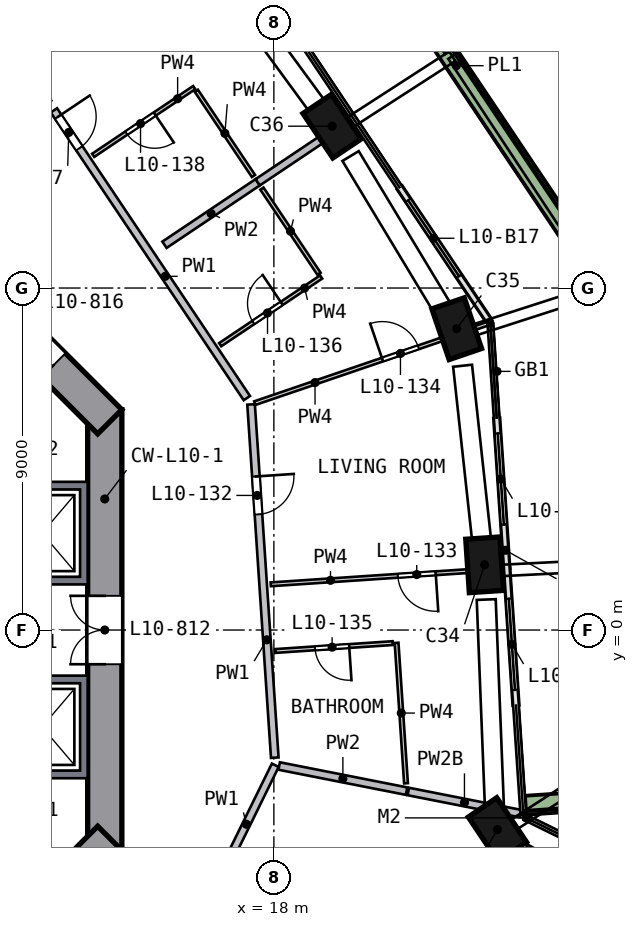
"""IFC4 building model, lengths in metres.
Left out: names, types, materials, properties, quantities, classifications, styles, units other than length and angle.
Written with IfcOpenShell. Run it as: python <this file> out.ifc"""

import sys

from ifc_helpers import new_model, si_unit, direction, frame, frame_2d, origin, origin_2d, place, context, subcontext, project, spatial, polyline, rectangle, outline, extrude, element, fill, save


model = new_model("IFC4")
c1 = context("Model", 3, precision=1e-05, world=origin(), true_north=direction((0.0, 1.0)))
c2 = subcontext(c1, "Body", "Model", "MODEL_VIEW")
j1 = project(units=[si_unit("LENGTHUNIT", "METRE"), si_unit("PLANEANGLEUNIT", "RADIAN")], contexts=[c1])
p1 = place(None, origin())
s1 = spatial("IfcSite", under=j1, at=p1, CompositionType="ELEMENT")
p2 = place(p1, origin())
s2 = spatial("IfcBuilding", under=s1, at=p2, CompositionType="ELEMENT")
p3 = place(p2, frame((0.0, 0.0, 49.5)))
s3 = spatial("IfcBuildingStorey", under=s2, at=p3, CompositionType="ELEMENT", Elevation=49.5)
p4 = place(p3, frame((23.853, -5.388, 0.0), z_axis=(0.024628968, 0.113642923, 0.993216341), x_axis=(0.560989049, -0.823913514, 0.080360497)))
e1 = element("IfcColumn", 1, at=p4, inside=s3, PredefinedType="COLUMN", context=c2, shape_type="SweptSolid", body=[
    extrude(rectangle(XDim=1.4, YDim=0.9, at=origin_2d()), origin(), (0.0, 0.0, 1.0), 3.212),
])
p5 = place(p3, frame((23.555, 1.581, 0.0), z_axis=(-0.008441555, 0.112021718, 0.993669902), x_axis=(-0.066257297, 0.991458896, -0.112335337)))
e2 = element("IfcColumn", 2, at=p5, inside=s3, PredefinedType="COLUMN", context=c2, shape_type="SweptSolid", body=[
    extrude(rectangle(XDim=1.4, YDim=0.9, at=origin_2d()), origin(), (0.0, 0.0, 1.0), 3.21),
])
p6 = place(p3, frame((22.857, 7.799, 0.0), z_axis=(-0.038013875, 0.108415572, 0.993378583), x_axis=(0.320720069, -0.940181145, 0.114882776)))
e3 = element("IfcColumn", 3, at=p6, inside=s3, PredefinedType="COLUMN", context=c2, shape_type="SweptSolid", body=[
    extrude(rectangle(XDim=1.4, YDim=0.9, at=origin_2d()), origin(), (0.0, 0.0, 1.0), 3.211),
])
p7 = place(p3, frame((19.609, 13.147, 0.0), z_axis=(-0.063274346, 0.092706042, 0.993681009), x_axis=(-0.553189961, 0.825459696, -0.112237059)))
e4 = element("IfcColumn", 4, at=p7, inside=s3, PredefinedType="COLUMN", context=c2, shape_type="SweptSolid", body=[
    extrude(rectangle(XDim=1.4, YDim=0.9, at=origin_2d()), origin(), (0.0, 0.0, 1.0), 3.21),
])
p8 = place(p3, frame((13.55, -5.799, 0.0), z_axis=(0.0, 0.0, 1.0), x_axis=(0.0, 1.0, 0.0)))
e5 = element("IfcWall", 5, at=p8, inside=s3, PredefinedType="SHEAR", context=c2, shape_type="SweptSolid", body=[
    extrude(rectangle(XDim=11.598, YDim=0.9, at=frame_2d((5.799, 0.0))), origin(), (0.0, 0.0, 1.0), 3.5),
])
p9 = place(p8, frame((4.899, 0.0, 0.0)))
e6 = element("IfcOpeningElement", 6, at=p9, cuts=e5, PredefinedType="OPENING", context=c2, shape_type="SweptSolid", body=[
    extrude(rectangle(XDim=1.8, YDim=2.1, at=frame_2d((0.9, 1.05))), frame((0.0, 0.46, 0.0), z_axis=(0.0, -1.0, 0.0), x_axis=(1.0, 0.0, 0.0)), (0.0, 0.0, 1.0), 0.92),
])
p10 = place(p3, frame((13.682, 5.481, 0.0), z_axis=(0.0, 0.0, 1.0), x_axis=(-0.707106781, 0.707106781, 0.0)))
e7 = element("IfcWall", 7, at=p10, inside=s3, PredefinedType="SHEAR", context=c2, shape_type="SweptSolid", body=[
    extrude(rectangle(XDim=11.598, YDim=0.9, at=frame_2d((5.799, 0.0))), origin(), (0.0, 0.0, 1.0), 3.5),
])
p11 = place(p10, frame((2.099, 0.0, 0.0)))
e8 = element("IfcOpeningElement", 8, at=p11, cuts=e7, PredefinedType="OPENING", context=c2, shape_type="SweptSolid", body=[
    extrude(rectangle(XDim=1.2, YDim=2.1, at=frame_2d((0.6, 1.05))), frame((0.0, 0.46, 0.0), z_axis=(0.0, -1.0, 0.0), x_axis=(1.0, 0.0, 0.0)), (0.0, 0.0, 1.0), 0.92),
])
p12 = place(p3, frame((5.481, -13.682, 0.0), z_axis=(0.0, 0.0, 1.0), x_axis=(0.707106781, 0.707106781, 0.0)))
e9 = element("IfcWall", 9, at=p12, inside=s3, PredefinedType="SHEAR", context=c2, shape_type="SweptSolid", body=[
    extrude(rectangle(XDim=11.598, YDim=0.9, at=frame_2d((5.799, 0.0))), origin(), (0.0, 0.0, 1.0), 3.5),
])
p13 = place(p12, frame((2.099, 0.0, 0.0)))
e10 = element("IfcOpeningElement", 10, at=p13, cuts=e9, PredefinedType="OPENING", context=c2, shape_type="SweptSolid", body=[
    extrude(rectangle(XDim=1.2, YDim=2.1, at=frame_2d((0.6, 1.05))), frame((0.0, 0.46, 0.0), z_axis=(0.0, -1.0, 0.0), x_axis=(1.0, 0.0, 0.0)), (0.0, 0.0, 1.0), 0.92),
])
p14 = place(p3, frame((24.37, -1.972, 0.0), z_axis=(0.0, 0.0, 1.0), x_axis=(-0.066933094, 0.997757466, 0.0)))
e11 = element("IfcWall", 11, at=p14, inside=s3, PredefinedType="SOLIDWALL", context=c2, shape_type="SweptSolid", body=[
    extrude(rectangle(XDim=3.6, YDim=0.15, at=frame_2d((1.8, 0.0))), origin(), (0.0, 0.0, 1.0), 2.425),
])
p15 = place(p14, frame((0.4, 0.0, 0.0)))
e12 = element("IfcOpeningElement", 12, at=p15, cuts=e11, PredefinedType="OPENING", context=c2, shape_type="SweptSolid", body=[
    extrude(rectangle(XDim=2.4, YDim=2.4, at=frame_2d((1.2, 1.2))), frame((0.0, 0.085, 0.0), z_axis=(0.0, -1.0, 0.0), x_axis=(1.0, 0.0, 0.0)), (0.0, 0.0, 1.0), 0.17),
])
p16 = place(p3, frame((24.129, 1.62, 0.0), z_axis=(0.0, 0.0, 1.0), x_axis=(-0.067005873, 0.997752581, 0.0)))
e13 = element("IfcWall", 13, at=p16, inside=s3, PredefinedType="SOLIDWALL", context=c2, shape_type="SweptSolid", body=[
    extrude(rectangle(XDim=3.96, YDim=0.15, at=frame_2d((1.98, 0.0))), origin(), (0.0, 0.0, 1.0), 2.425),
])
p17 = place(p16, frame((1.16, 0.0, 0.0)))
e14 = element("IfcOpeningElement", 14, at=p17, cuts=e13, PredefinedType="OPENING", context=c2, shape_type="SweptSolid", body=[
    extrude(rectangle(XDim=2.4, YDim=2.4, at=frame_2d((1.2, 1.2))), frame((0.0, 0.085, 0.0), z_axis=(0.0, -1.0, 0.0), x_axis=(1.0, 0.0, 0.0)), (0.0, 0.0, 1.0), 0.17),
])
p18 = place(p3, frame((23.65, 8.151, 0.0), z_axis=(0.0, 0.0, 1.0), x_axis=(-0.556858652, 0.830607273, 0.0)))
e15 = element("IfcWall", 15, at=p18, inside=s3, PredefinedType="SOLIDWALL", context=c2, shape_type="SweptSolid", body=[
    extrude(rectangle(XDim=4.199, YDim=0.15, at=frame_2d((2.099, 0.0))), origin(), (0.0, 0.0, 1.0), 2.425),
])
p19 = place(p18, frame((1.399, 0.0, 0.0)))
e16 = element("IfcOpeningElement", 16, at=p19, cuts=e15, PredefinedType="OPENING", context=c2, shape_type="SweptSolid", body=[
    extrude(rectangle(XDim=2.4, YDim=2.4, at=frame_2d((1.2, 1.2))), frame((0.0, 0.085, 0.0), z_axis=(0.0, -1.0, 0.0), x_axis=(1.0, 0.0, 0.0)), (0.0, 0.0, 1.0), 0.17),
])
p20 = place(p3, frame((24.624, -4.611, 0.0), z_axis=(0.0, 0.0, 1.0), x_axis=(0.997752279, 0.067010365, 0.0)))
e17 = element("IfcWall", 17, at=p20, inside=s3, PredefinedType="SOLIDWALL", context=c2, shape_type="SweptSolid", body=[
    extrude(rectangle(XDim=3.199, YDim=0.5, at=frame_2d((1.599, 0.0))), origin(), (0.0, 0.0, 1.0), 0.7),
])
p21 = place(p3, frame((26.622, 9.152, 0.0), z_axis=(0.0, 0.0, 1.0), x_axis=(-0.55686597, 0.830602367, 0.0)))
e18 = element("IfcWall", 18, at=p21, inside=s3, PredefinedType="SOLIDWALL", context=c2, shape_type="SweptSolid", body=[
    extrude(rectangle(XDim=13.723, YDim=0.5, at=frame_2d((6.862, 0.0))), origin(), (0.0, 0.0, 1.0), 0.7),
])
p22 = place(p3, origin())
e19 = element("IfcWall", 19, at=p22, inside=s3, PredefinedType="SOLIDWALL", context=c2, shape_type="SweptSolid", body=[
    extrude(outline(polyline([(13.1, -3.9), (10.9, -3.9), (10.9, -3.7), (12.9, -3.7), (12.9, -1.4), (10.9, -1.4), (10.9, -1.2), (13.1, -1.2), (13.1, -3.9)])), origin(), (0.0, 0.0, 1.0), 3.19),
])
p23 = place(p3, origin())
e20 = element("IfcWall", 20, at=p23, inside=s3, PredefinedType="SOLIDWALL", context=c2, shape_type="SweptSolid", body=[
    extrude(outline(polyline([(13.1, 3.9), (13.1, 1.2), (10.9, 1.2), (10.9, 1.4), (12.9, 1.4), (12.9, 3.7), (10.9, 3.7), (10.9, 3.9), (13.1, 3.9)])), origin(), (0.0, 0.0, 1.0), 3.19),
])
p24 = place(p3, frame((12.212, 13.675, 0.0), z_axis=(0.0, 0.0, 1.0), x_axis=(0.556867612, -0.830601266, 0.0)))
e21 = element("IfcWall", 21, at=p24, inside=s3, PredefinedType="SOLIDWALL", context=c2, shape_type="SweptSolid", body=[
    extrude(rectangle(XDim=9.116, YDim=0.2, at=frame_2d((4.558, 0.0))), origin(), (0.0, 0.0, 1.0), 3.19),
])
p25 = place(p24, frame((0.2, 0.0, 0.0)))
e22 = element("IfcOpeningElement", 22, at=p25, cuts=e21, PredefinedType="OPENING", context=c2, shape_type="SweptSolid", body=[
    extrude(rectangle(XDim=1.0, YDim=2.1, at=frame_2d((0.5, 1.05))), frame((0.0, 0.11, 0.0), z_axis=(0.0, -1.0, 0.0), x_axis=(1.0, 0.0, 0.0)), (0.0, 0.0, 1.0), 0.22),
])
p26 = place(p3, frame((16.512, -6.662, 0.0), z_axis=(0.0, 0.0, 1.0), x_axis=(0.44087694, 0.89756756, 0.0)))
e23 = element("IfcWall", 23, at=p26, inside=s3, PredefinedType="SOLIDWALL", context=c2, shape_type="SweptSolid", body=[
    extrude(rectangle(XDim=3.458, YDim=0.2, at=frame_2d((1.729, 0.0))), origin(), (0.0, 0.0, 1.0), 3.19),
])
p27 = place(p3, frame((17.4, 5.937, 0.0), z_axis=(0.0, 0.0, 1.0), x_axis=(0.066952071, -0.997756193, 0.0)))
e24 = element("IfcWall", 24, at=p27, inside=s3, PredefinedType="SOLIDWALL", context=c2, shape_type="SweptSolid", body=[
    extrude(rectangle(XDim=9.317, YDim=0.2, at=frame_2d((4.658, 0.0))), origin(), (0.0, 0.0, 1.0), 3.19),
])
p28 = place(p27, frame((1.9, 0.0, 0.0)))
e25 = element("IfcOpeningElement", 25, at=p28, cuts=e24, PredefinedType="OPENING", context=c2, shape_type="SweptSolid", body=[
    extrude(rectangle(XDim=1.0, YDim=2.1, at=frame_2d((0.5, 1.05))), frame((0.0, 0.11, 0.0), z_axis=(0.0, -1.0, 0.0), x_axis=(1.0, 0.0, 0.0)), (0.0, 0.0, 1.0), 0.22),
])
p29 = place(p3, frame((15.122, 10.138, 0.0), z_axis=(0.0, 0.0, 1.0), x_axis=(0.830546242, 0.556949675, 0.0)))
e26 = element("IfcWall", 26, at=p29, inside=s3, PredefinedType="SOLIDWALL", context=c2, shape_type="SweptSolid", body=[
    extrude(rectangle(XDim=2.953, YDim=0.2, at=frame_2d((1.476, 0.0))), origin(), (0.0, 0.0, 1.0), 3.19),
])
p30 = place(p3, frame((17.574, 11.783, 0.0), z_axis=(0.0, 0.0, 1.0), x_axis=(0.830647114, 0.556799221, 0.0)))
e27 = element("IfcWall", 27, at=p30, inside=s3, PredefinedType="SOLIDWALL", context=c2, shape_type="SweptSolid", body=[
    extrude(rectangle(XDim=2.95, YDim=0.2, at=frame_2d((1.475, 0.0))), origin(), (0.0, 0.0, 1.0), 3.19),
])
p31 = place(p3, frame((18.139, -3.578, 0.0), z_axis=(0.0, 0.0, 1.0), x_axis=(0.981090984, -0.193547104, 0.0)))
e28 = element("IfcWall", 28, at=p31, inside=s3, PredefinedType="SOLIDWALL", context=c2, shape_type="SweptSolid", body=[
    extrude(rectangle(XDim=3.418, YDim=0.2, at=frame_2d((1.709, 0.0))), origin(), (0.0, 0.0, 1.0), 3.19),
])
p32 = place(p3, frame((21.538, -4.249, 0.0), z_axis=(0.0, 0.0, 1.0), x_axis=(0.981079499, -0.193605309, 0.0)))
e29 = element("IfcWall", 29, at=p32, inside=s3, PredefinedType="SOLIDWALL", context=c2, shape_type="SweptSolid", body=[
    extrude(rectangle(XDim=3.011, YDim=0.2, at=frame_2d((1.506, 0.0))), origin(), (0.0, 0.0, 1.0), 2.69),
])
p33 = place(p3, frame((15.903, 14.274, 0.0), z_axis=(0.0, 0.0, 1.0), x_axis=(-0.830544822, -0.556951792, 0.0)))
e30 = element("IfcWall", 30, at=p33, inside=s3, PredefinedType="PARTITIONING", context=c2, shape_type="SweptSolid", body=[
    extrude(rectangle(XDim=3.2, YDim=0.1, at=frame_2d((1.6, 0.0))), origin(), (0.0, 0.0, 1.0), 3.19),
])
p34 = place(p33, frame((1.25, 0.0, 0.0)))
e31 = element("IfcOpeningElement", 31, at=p34, cuts=e30, PredefinedType="OPENING", context=c2, shape_type="SweptSolid", body=[
    extrude(rectangle(XDim=0.9, YDim=2.1, at=frame_2d((0.45, 1.05))), frame((0.0, 0.06, 0.0), z_axis=(0.0, -1.0, 0.0), x_axis=(1.0, 0.0, 0.0)), (0.0, 0.0, 1.0), 0.12),
])
p35 = place(p3, frame((15.959, 14.191, 0.0), z_axis=(0.0, 0.0, 1.0), x_axis=(0.55688919, -0.830586799, 0.0)))
e32 = element("IfcWall", 32, at=p35, inside=s3, PredefinedType="PARTITIONING", context=c2, shape_type="SweptSolid", body=[
    extrude(rectangle(XDim=2.7, YDim=0.1, at=frame_2d((1.35, 0.0))), origin(), (0.0, 0.0, 1.0), 3.19),
])
p36 = place(p3, frame((16.587, 7.509, 0.0), z_axis=(0.0, 0.0, 1.0), x_axis=(0.830603775, 0.55686387, 0.0)))
e33 = element("IfcWall", 33, at=p36, inside=s3, PredefinedType="PARTITIONING", context=c2, shape_type="SweptSolid", body=[
    extrude(rectangle(XDim=3.2, YDim=0.1, at=frame_2d((1.6, 0.0))), origin(), (0.0, 0.0, 1.0), 3.19),
])
p37 = place(p36, frame((1.05, 0.0, 0.0)))
e34 = element("IfcOpeningElement", 34, at=p37, cuts=e33, PredefinedType="OPENING", context=c2, shape_type="SweptSolid", body=[
    extrude(rectangle(XDim=0.9, YDim=2.1, at=frame_2d((0.45, 1.05))), frame((0.0, 0.06, 0.0), z_axis=(0.0, -1.0, 0.0), x_axis=(1.0, 0.0, 0.0)), (0.0, 0.0, 1.0), 0.12),
])
p38 = place(p3, frame((19.189, 9.374, 0.0), z_axis=(0.0, 0.0, 1.0), x_axis=(-0.55688919, 0.830586799, 0.0)))
e35 = element("IfcWall", 35, at=p38, inside=s3, PredefinedType="PARTITIONING", context=c2, shape_type="SweptSolid", body=[
    extrude(rectangle(XDim=2.7, YDim=0.1, at=frame_2d((1.35, 0.0))), origin(), (0.0, 0.0, 1.0), 3.19),
])
p39 = place(p3, frame((21.129, -0.344, 0.0), z_axis=(0.0, 0.0, 1.0), x_axis=(-0.997751578, -0.067020806, 0.0)))
e36 = element("IfcWall", 36, at=p39, inside=s3, PredefinedType="PARTITIONING", context=c2, shape_type="SweptSolid", body=[
    extrude(rectangle(XDim=3.1, YDim=0.1, at=frame_2d((1.55, 0.0))), origin(), (0.0, 0.0, 1.0), 3.19),
])
p40 = place(p39, frame((1.15, 0.0, 0.0)))
e37 = element("IfcOpeningElement", 37, at=p40, cuts=e36, PredefinedType="OPENING", context=c2, shape_type="SweptSolid", body=[
    extrude(rectangle(XDim=0.9, YDim=2.1, at=frame_2d((0.45, 1.05))), frame((0.0, 0.06, 0.0), z_axis=(0.0, -1.0, 0.0), x_axis=(1.0, 0.0, 0.0)), (0.0, 0.0, 1.0), 0.12),
])
p41 = place(p3, frame((17.498, 5.97, 0.0), z_axis=(0.0, 0.0, 1.0), x_axis=(0.946431654, 0.322904203, 0.0)))
e38 = element("IfcWall", 38, at=p41, inside=s3, PredefinedType="PARTITIONING", context=c2, shape_type="SweptSolid", body=[
    extrude(rectangle(XDim=6.476, YDim=0.1, at=frame_2d((3.238, 0.0))), origin(), (0.0, 0.0, 1.0), 3.19),
])
p42 = place(p41, frame((3.55, 0.0, 0.0)))
e39 = element("IfcOpeningElement", 39, at=p42, cuts=e38, PredefinedType="OPENING", context=c2, shape_type="SweptSolid", body=[
    extrude(rectangle(XDim=1.0, YDim=2.1, at=frame_2d((0.5, 1.05))), frame((0.0, 0.06, 0.0), z_axis=(0.0, -1.0, 0.0), x_axis=(1.0, 0.0, 0.0)), (0.0, 0.0, 1.0), 0.12),
])
p43 = place(p3, frame((24.054, 1.615, 0.0), z_axis=(0.0, 0.0, 1.0), x_axis=(-0.99775502, -0.066969552, 0.0)))
e40 = element("IfcWall", 40, at=p43, inside=s3, PredefinedType="PARTITIONING", context=c2, shape_type="SweptSolid", body=[
    extrude(rectangle(XDim=6.15, YDim=0.1, at=frame_2d((3.075, 0.0))), origin(), (0.0, 0.0, 1.0), 3.19),
])
p44 = place(p43, frame((1.8, 0.0, 0.0)))
e41 = element("IfcOpeningElement", 41, at=p44, cuts=e40, PredefinedType="OPENING", context=c2, shape_type="SweptSolid", body=[
    extrude(rectangle(XDim=1.0, YDim=2.1, at=frame_2d((0.5, 1.05))), frame((0.0, 0.06, 0.0), z_axis=(0.0, -1.0, 0.0), x_axis=(1.0, 0.0, 0.0)), (0.0, 0.0, 1.0), 0.12),
])
p45 = place(p3, frame((21.477, -4.033, 0.0), z_axis=(0.0, 0.0, 1.0), x_axis=(-0.066965213, 0.997755311, 0.0)))
e42 = element("IfcWall", 42, at=p45, inside=s3, PredefinedType="PARTITIONING", context=c2, shape_type="SweptSolid", body=[
    extrude(rectangle(XDim=3.704, YDim=0.1, at=frame_2d((1.852, 0.0))), origin(), (0.0, 0.0, 1.0), 3.19),
])
p46 = place(p15, origin())
e43 = element("IfcDoor", 43, at=p46, inside=s3, OperationType="SLIDING_TO_RIGHT", PredefinedType="DOOR", context=c2, shape_type="SweptSolid", body=[
    extrude(rectangle(XDim=2.4, YDim=2.4, at=frame_2d((1.2, 1.2))), frame((0.0, 0.025, 0.0), z_axis=(0.0, -1.0, 0.0), x_axis=(1.0, 0.0, 0.0)), (0.0, 0.0, 1.0), 0.05),
])
fill(e12, e43)
p47 = place(p17, origin())
e44 = element("IfcDoor", 44, at=p47, inside=s3, OperationType="SLIDING_TO_LEFT", PredefinedType="DOOR", context=c2, shape_type="SweptSolid", body=[
    extrude(rectangle(XDim=2.4, YDim=2.4, at=frame_2d((1.2, 1.2))), frame((0.0, 0.025, 0.0), z_axis=(0.0, -1.0, 0.0), x_axis=(1.0, 0.0, 0.0)), (0.0, 0.0, 1.0), 0.05),
])
fill(e14, e44)
p48 = place(p19, origin())
e45 = element("IfcDoor", 45, at=p48, inside=s3, OperationType="SLIDING_TO_LEFT", PredefinedType="DOOR", context=c2, shape_type="SweptSolid", body=[
    extrude(rectangle(XDim=2.4, YDim=2.4, at=frame_2d((1.2, 1.2))), frame((0.0, 0.025, 0.0), z_axis=(0.0, -1.0, 0.0), x_axis=(1.0, 0.0, 0.0)), (0.0, 0.0, 1.0), 0.05),
])
fill(e16, e45)
p49 = place(p9, origin())
e46 = element("IfcDoor", 46, at=p49, inside=s3, OperationType="DOUBLE_DOOR_SINGLE_SWING", PredefinedType="DOOR", context=c2, shape_type="SweptSolid", body=[
    extrude(rectangle(XDim=1.8, YDim=2.1, at=frame_2d((0.9, 1.05))), frame((0.0, 0.025, 0.0), z_axis=(0.0, -1.0, 0.0), x_axis=(1.0, 0.0, 0.0)), (0.0, 0.0, 1.0), 0.05),
])
fill(e6, e46)
p50 = place(p11, origin())
e47 = element("IfcDoor", 47, at=p50, inside=s3, OperationType="SINGLE_SWING_LEFT", PredefinedType="DOOR", context=c2, shape_type="SweptSolid", body=[
    extrude(rectangle(XDim=1.2, YDim=2.1, at=frame_2d((0.6, 1.05))), frame((0.0, 0.025, 0.0), z_axis=(0.0, -1.0, 0.0), x_axis=(1.0, 0.0, 0.0)), (0.0, 0.0, 1.0), 0.05),
])
fill(e8, e47)
p51 = place(p28, origin())
e48 = element("IfcDoor", 48, at=p51, inside=s3, OperationType="SINGLE_SWING_LEFT", PredefinedType="DOOR", context=c2, shape_type="SweptSolid", body=[
    extrude(rectangle(XDim=1.0, YDim=2.1, at=frame_2d((0.5, 1.05))), frame((0.0, 0.025, 0.0), z_axis=(0.0, -1.0, 0.0), x_axis=(1.0, 0.0, 0.0)), (0.0, 0.0, 1.0), 0.05),
])
fill(e25, e48)
p52 = place(p44, origin())
e49 = element("IfcDoor", 49, at=p52, inside=s3, OperationType="SINGLE_SWING_LEFT", PredefinedType="DOOR", context=c2, shape_type="SweptSolid", body=[
    extrude(rectangle(XDim=1.0, YDim=2.1, at=frame_2d((0.5, 1.05))), frame((0.0, 0.025, 0.0), z_axis=(0.0, -1.0, 0.0), x_axis=(1.0, 0.0, 0.0)), (0.0, 0.0, 1.0), 0.05),
])
fill(e41, e49)
p53 = place(p42, origin())
e50 = element("IfcDoor", 50, at=p53, inside=s3, OperationType="SINGLE_SWING_LEFT", PredefinedType="DOOR", context=c2, shape_type="SweptSolid", body=[
    extrude(rectangle(XDim=1.0, YDim=2.1, at=frame_2d((0.5, 1.05))), frame((0.0, 0.025, 0.0), z_axis=(0.0, -1.0, 0.0), x_axis=(1.0, 0.0, 0.0)), (0.0, 0.0, 1.0), 0.05),
])
fill(e39, e50)
p54 = place(p40, origin())
e51 = element("IfcDoor", 51, at=p54, inside=s3, OperationType="SINGLE_SWING_LEFT", PredefinedType="DOOR", context=c2, shape_type="SweptSolid", body=[
    extrude(rectangle(XDim=0.9, YDim=2.1, at=frame_2d((0.45, 1.05))), frame((0.0, 0.025, 0.0), z_axis=(0.0, -1.0, 0.0), x_axis=(1.0, 0.0, 0.0)), (0.0, 0.0, 1.0), 0.05),
])
fill(e37, e51)
p55 = place(p37, origin())
e52 = element("IfcDoor", 52, at=p55, inside=s3, OperationType="SINGLE_SWING_RIGHT", PredefinedType="DOOR", context=c2, shape_type="SweptSolid", body=[
    extrude(rectangle(XDim=0.9, YDim=2.1, at=frame_2d((0.45, 1.05))), frame((0.0, 0.025, 0.0), z_axis=(0.0, -1.0, 0.0), x_axis=(1.0, 0.0, 0.0)), (0.0, 0.0, 1.0), 0.05),
])
fill(e34, e52)
p56 = place(p25, origin())
e53 = element("IfcDoor", 53, at=p56, inside=s3, OperationType="SINGLE_SWING_LEFT", PredefinedType="DOOR", context=c2, shape_type="SweptSolid", body=[
    extrude(rectangle(XDim=1.0, YDim=2.1, at=frame_2d((0.5, 1.05))), frame((0.0, 0.025, 0.0), z_axis=(0.0, -1.0, 0.0), x_axis=(1.0, 0.0, 0.0)), (0.0, 0.0, 1.0), 0.05),
])
fill(e22, e53)
p57 = place(p34, origin())
e54 = element("IfcDoor", 54, at=p57, inside=s3, OperationType="SINGLE_SWING_LEFT", PredefinedType="DOOR", context=c2, shape_type="SweptSolid", body=[
    extrude(rectangle(XDim=0.9, YDim=2.1, at=frame_2d((0.45, 1.05))), frame((0.0, 0.025, 0.0), z_axis=(0.0, -1.0, 0.0), x_axis=(1.0, 0.0, 0.0)), (0.0, 0.0, 1.0), 0.05),
])
fill(e31, e54)
save(model, sys.argv[1])
